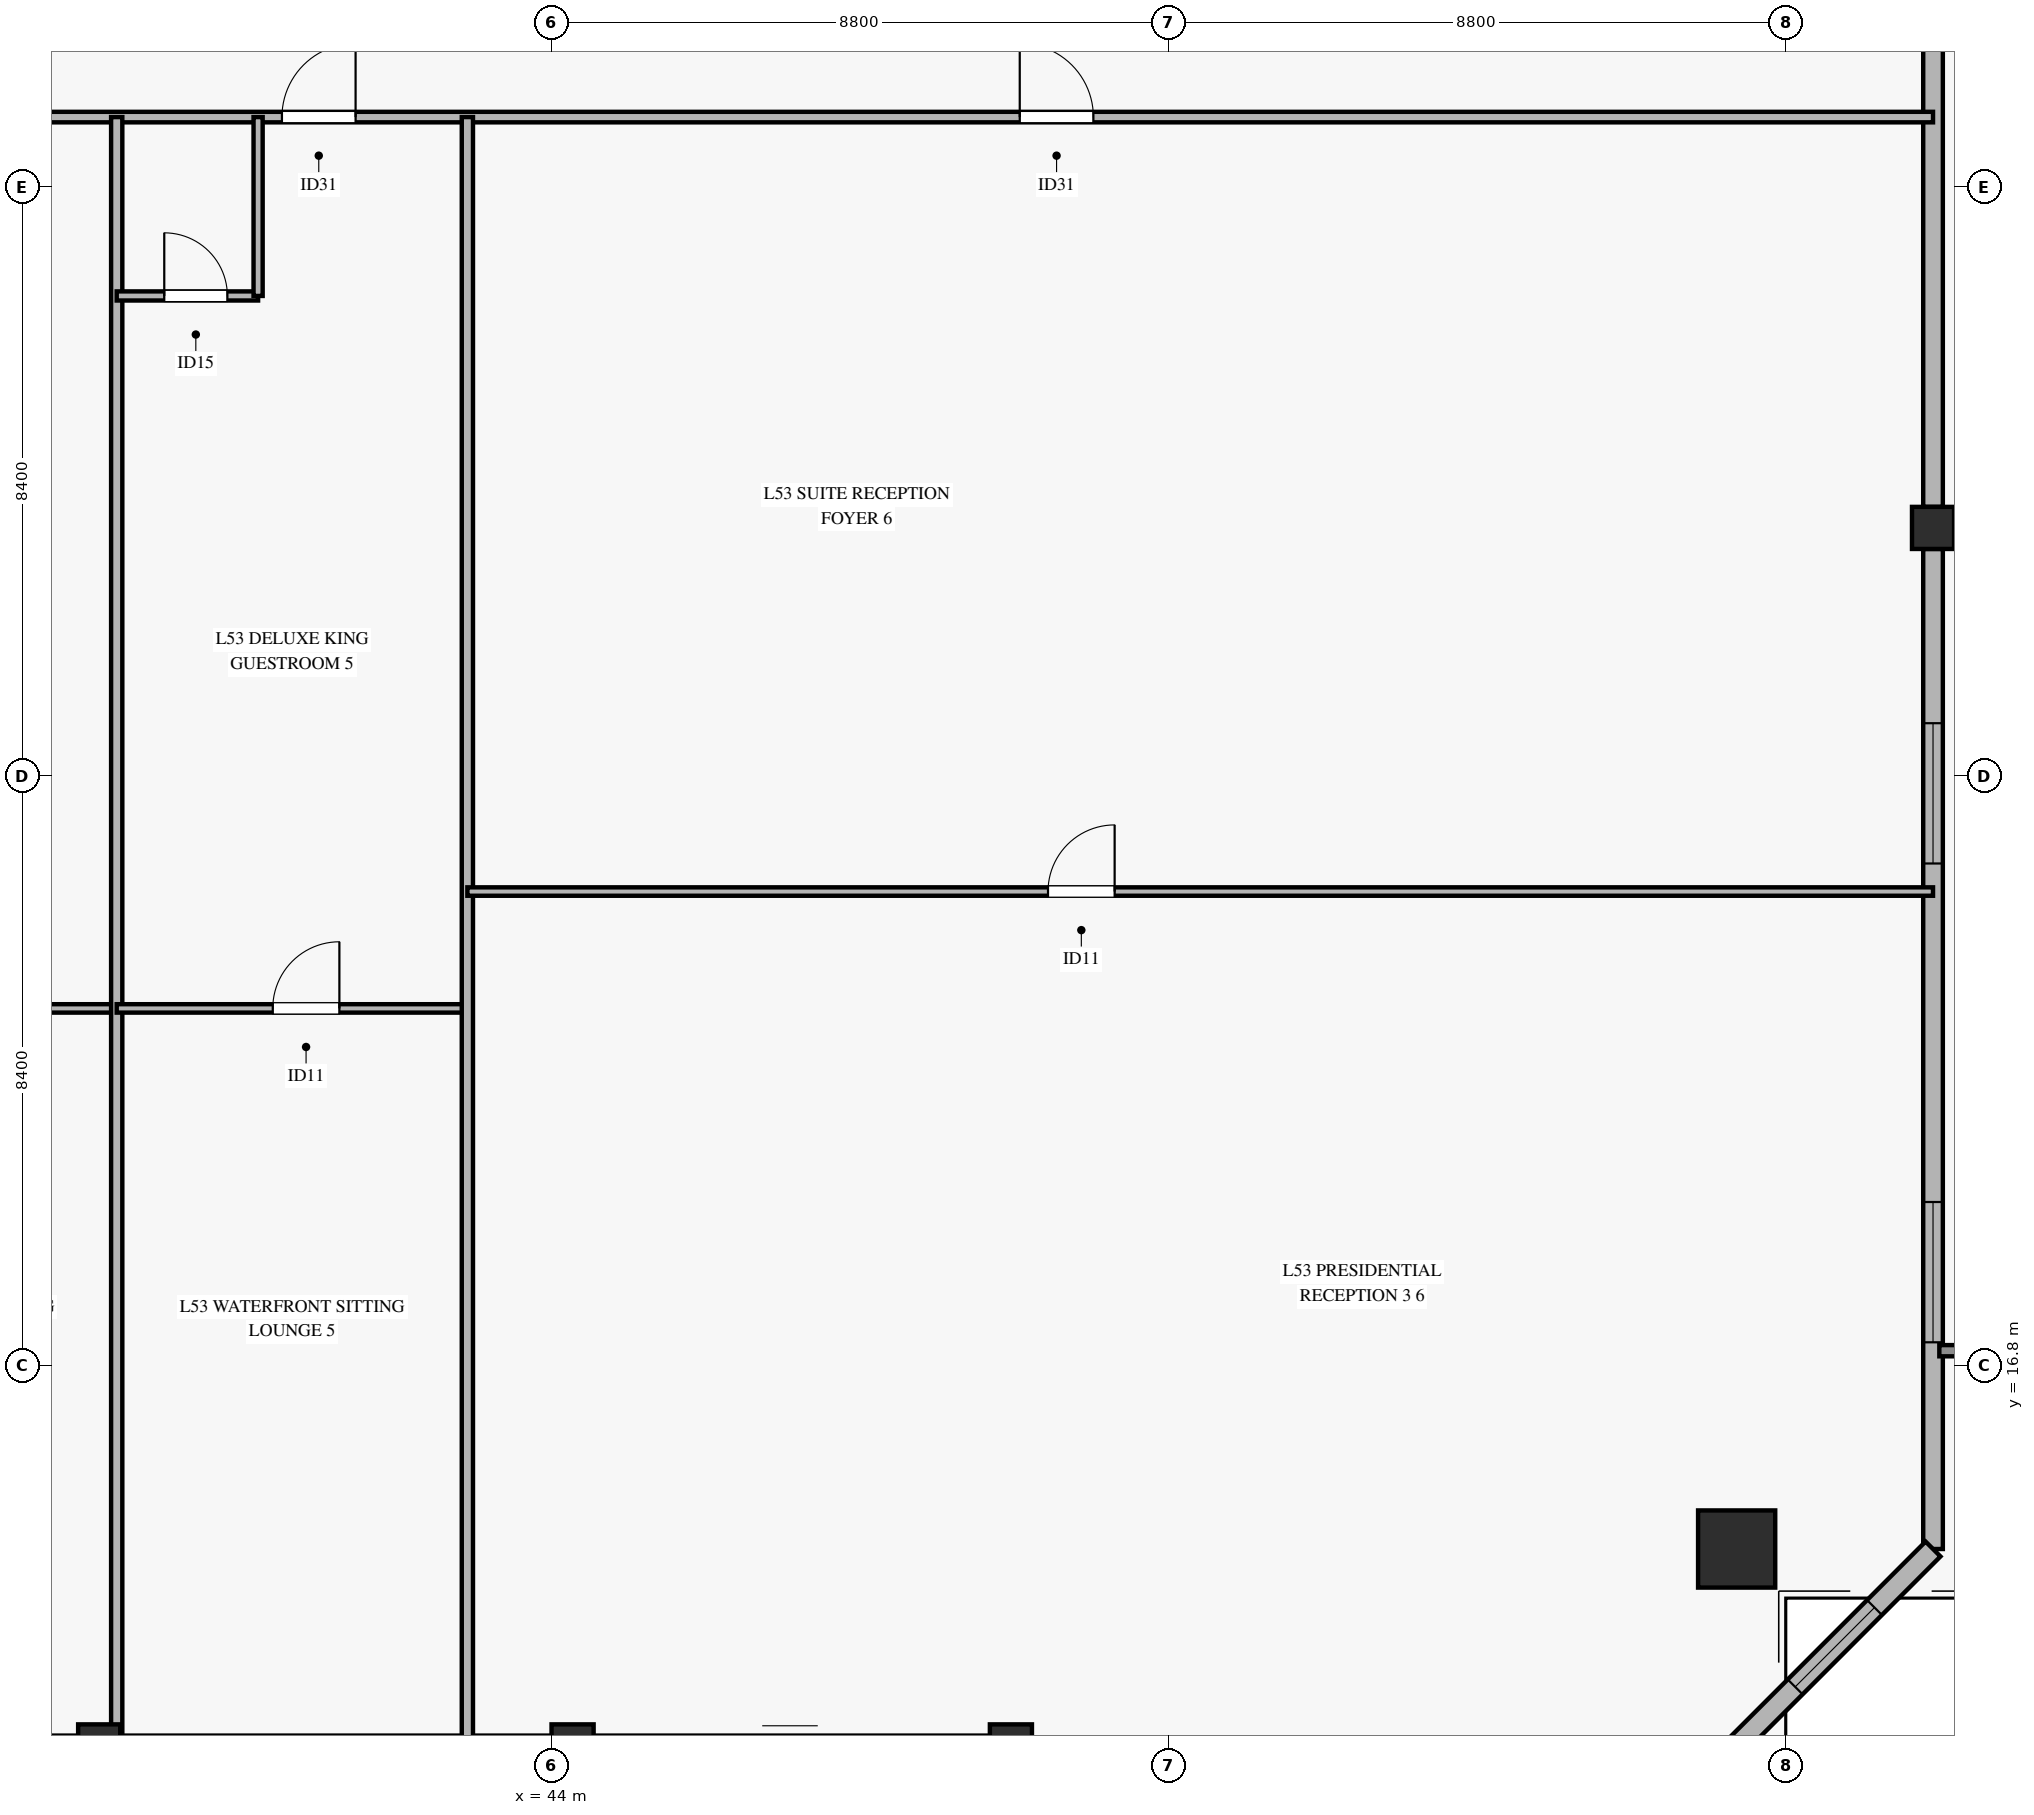
"""IFC4 building model, lengths in metres.
Left out: names, types, materials, properties, quantities, classifications, styles, units other than length and angle.
Written with IfcOpenShell. Run it as: python <this file> out.ifc"""

import sys

from ifc_helpers import new_model, si_unit, direction, frame, frame_2d, origin, origin_2d, place, context, subcontext, project, spatial, rectangle, hollow_rectangle, extrude, source, transform, mapped, element, fill, save


model = new_model("IFC4")
c1 = context("Model", 3, precision=1e-05, world=origin(), true_north=direction((0.0, 1.0)))
c2 = subcontext(c1, "Body", "Model", "MODEL_VIEW")
j1 = project(units=[si_unit("LENGTHUNIT", "METRE"), si_unit("PLANEANGLEUNIT", "RADIAN")], contexts=[c1])
p1 = place(None, origin())
s1 = spatial("IfcSite", under=j1, at=p1, CompositionType="ELEMENT")
p2 = place(p1, origin())
s2 = spatial("IfcBuilding", under=s1, at=p2, CompositionType="ELEMENT")
p3 = place(p2, frame((0.0, 0.0, 209.7)))
s3 = spatial("IfcBuildingStorey", under=s2, at=p3, CompositionType="ELEMENT", Elevation=209.7)
m1 = source(origin(), c2, "Body", "SweptSolid", [
    extrude(hollow_rectangle(XDim=1.1, YDim=1.1, WallThickness=0.05, at=origin_2d()), origin(), (0.0, 0.0, 1.0), 3.408),
])
p4 = place(p3, frame((60.898, 14.186, 0.0), z_axis=(-0.108529227713, 0.259968691334, 0.959498664021), x_axis=(-0.922813390135, -0.385247254355, 0.0)))
e1 = element("IfcColumn", 1, at=p4, inside=s3, PredefinedType="COLUMN", context=c2, shape_type="MappedRepresentation", body=[
    mapped(m1, transform((0.0, 0.0, 0.0), x_axis=(1.0, 0.0, 0.0), y_axis=(0.0, 1.0, 0.0), z_axis=(0.0, 0.0, 1.0), scale=1.0)),
])
m2 = source(origin(), c2, "Body", "SweptSolid", [
    extrude(hollow_rectangle(XDim=0.6, YDim=0.6, WallThickness=0.028, at=origin_2d()), origin(), (0.0, 0.0, 1.0), 3.4),
])
for number, where, z_axis, x_axis in (
    (2, (37.55, 11.386, 0.0), (0.0, 0.274, 0.962), (-1.0, 0.0, 0.0)),
    (3, (44.3, 11.386, 0.0), (0.0, 0.274, 0.962), (-1.0, 0.0, 0.0)),
    (4, (50.55, 11.386, 0.0), (0.0, 0.274, 0.962), (-1.0, 0.0, 0.0)),
):
    element("IfcColumn", number, at=place(p3, frame(where, z_axis=z_axis, x_axis=x_axis)), inside=s3, PredefinedType="COLUMN", context=c2, shape_type="MappedRepresentation", body=[
        mapped(m2, transform((0.0, 0.0, 0.0), x_axis=(1.0, 0.0, 0.0), y_axis=(0.0, 1.0, 0.0), z_axis=(0.0, 0.0, 1.0), scale=1.0)),
    ])
m3 = source(origin(), c2, "Body", "SweptSolid", [
    extrude(hollow_rectangle(XDim=0.6, YDim=0.6, WallThickness=0.028, at=origin_2d()), origin(), (0.0, 0.0, 1.0), 3.329),
])
p5 = place(p3, frame((63.698, 28.743, 0.0), z_axis=(-0.124961102181, 0.139994568113, 0.982235330173), x_axis=(-0.746027795602, -0.665914805504, 0.0)))
e5 = element("IfcColumn", 5, at=p5, inside=s3, PredefinedType="COLUMN", context=c2, shape_type="MappedRepresentation", body=[
    mapped(m3, transform((0.0, 0.0, 0.0), x_axis=(1.0, 0.0, 0.0), y_axis=(0.0, 1.0, 0.0), z_axis=(0.0, 0.0, 1.0), scale=1.0)),
])
for number, where, z_axis, x_axis in (
    (6, (31.1, 11.386, 0.0), (0.0, 0.0, 1.0), (1.0, 0.0, 0.0)),
    (7, (37.85, 11.386, 0.0), (0.0, 0.0, 1.0), (1.0, 0.0, 0.0)),
):
    element("IfcWall", number, at=place(p3, frame(where, z_axis=z_axis, x_axis=x_axis)), inside=s3, PredefinedType="SOLIDWALL", context=c2, shape_type="SweptSolid", body=[
        extrude(rectangle(XDim=6.15, YDim=0.28, at=frame_2d((3.075, 0.0))), origin(), (0.0, 0.0, 1.0), 2.75),
    ])
p6 = place(p3, frame((44.6, 11.386, 0.0), z_axis=(0.0, 0.0, 1.0), x_axis=(1.0, 0.0, 0.0)))
e8 = element("IfcWall", 8, at=p6, inside=s3, PredefinedType="SOLIDWALL", context=c2, shape_type="SweptSolid", body=[
    extrude(rectangle(XDim=5.65, YDim=0.28, at=frame_2d((2.825, 0.0))), origin(), (0.0, 0.0, 1.0), 2.75),
])
p7 = place(p6, frame((1.9, 0.0, 0.0)))
e9 = element("IfcOpeningElement", 9, at=p7, cuts=e8, PredefinedType="OPENING", context=c2, shape_type="SweptSolid", body=[
    extrude(rectangle(XDim=1.8, YDim=2.25, at=frame_2d((0.9, 1.125))), frame((0.0, 0.15, 0.0), z_axis=(0.0, -1.0, 0.0), x_axis=(1.0, 0.0, 0.0)), (0.0, 0.0, 1.0), 0.3),
])
p8 = place(p3, frame((63.698, 14.186, 0.0), z_axis=(0.0, 0.0, 1.0), x_axis=(0.0, 1.0, 0.0)))
e10 = element("IfcWall", 10, at=p8, inside=s3, PredefinedType="SOLIDWALL", context=c2, shape_type="SweptSolid", body=[
    extrude(rectangle(XDim=14.257, YDim=0.28, at=frame_2d((7.128, 0.0))), origin(), (0.0, 0.0, 1.0), 2.75),
])
p9 = place(p8, frame((2.947, 0.0, 0.45)))
e11 = element("IfcOpeningElement", 11, at=p9, cuts=e10, PredefinedType="OPENING", context=c2, shape_type="SweptSolid", body=[
    extrude(rectangle(XDim=2.0, YDim=2.0, at=frame_2d((1.0, 1.0))), frame((0.0, 0.15, 0.0), z_axis=(0.0, -1.0, 0.0), x_axis=(1.0, 0.0, 0.0)), (0.0, 0.0, 1.0), 0.3),
])
p10 = place(p8, frame((9.773, 0.0, 0.45)))
e12 = element("IfcOpeningElement", 12, at=p10, cuts=e10, PredefinedType="OPENING", context=c2, shape_type="SweptSolid", body=[
    extrude(rectangle(XDim=2.0, YDim=2.0, at=frame_2d((1.0, 1.0))), frame((0.0, 0.15, 0.0), z_axis=(0.0, -1.0, 0.0), x_axis=(1.0, 0.0, 0.0)), (0.0, 0.0, 1.0), 0.3),
])
p11 = place(p3, frame((63.698, 29.043, 0.0), z_axis=(0.0, 0.0, 1.0), x_axis=(0.0, 1.0, 0.0)))
e13 = element("IfcWall", 13, at=p11, inside=s3, PredefinedType="SOLIDWALL", context=c2, shape_type="SweptSolid", body=[
    extrude(rectangle(XDim=14.257, YDim=0.28, at=frame_2d((7.128, 0.0))), origin(), (0.0, 0.0, 1.0), 2.75),
])
p12 = place(p11, frame((8.812, 0.0, 0.45)))
e14 = element("IfcOpeningElement", 14, at=p12, cuts=e13, PredefinedType="OPENING", context=c2, shape_type="SweptSolid", body=[
    extrude(rectangle(XDim=2.0, YDim=2.0, at=frame_2d((1.0, 1.0))), frame((0.0, 0.15, 0.0), z_axis=(0.0, -1.0, 0.0), x_axis=(1.0, 0.0, 0.0)), (0.0, 0.0, 1.0), 0.3),
])
p13 = place(p3, frame((60.898, 11.386, 0.0), z_axis=(0.0, 0.0, 1.0), x_axis=(0.707106781187, 0.707106781187, 0.0)))
e15 = element("IfcWall", 15, at=p13, inside=s3, PredefinedType="SOLIDWALL", context=c2, shape_type="SweptSolid", body=[
    extrude(rectangle(XDim=3.96, YDim=0.3, at=frame_2d((1.98, 0.0))), origin(), (0.0, 0.0, 1.0), 2.75),
])
p14 = place(p13, frame((1.18, 0.0, 0.45)))
e16 = element("IfcOpeningElement", 16, at=p14, cuts=e15, PredefinedType="OPENING", context=c2, shape_type="SweptSolid", body=[
    extrude(rectangle(XDim=1.6, YDim=2.0, at=frame_2d((0.8, 1.0))), frame((0.0, 0.16, 0.0), z_axis=(0.0, -1.0, 0.0), x_axis=(1.0, 0.0, 0.0)), (0.0, 0.0, 1.0), 0.32),
])
p15 = place(p3, frame((6.703, 34.6, 0.0), z_axis=(0.0, 0.0, 1.0), x_axis=(1.0, 0.0, 0.0)))
e17 = element("IfcWall", 17, at=p15, inside=s3, PredefinedType="PARTITIONING", context=c2, shape_type="SweptSolid", body=[
    extrude(rectangle(XDim=56.995, YDim=0.15, at=frame_2d((28.498, 0.0))), origin(), (0.0, 0.0, 1.0), 2.455),
])
p16 = place(p15, frame((6.439, 0.0, 0.0)))
e18 = element("IfcOpeningElement", 18, at=p16, cuts=e17, PredefinedType="OPENING", context=c2, shape_type="SweptSolid", body=[
    extrude(rectangle(XDim=1.05, YDim=2.15, at=frame_2d((0.525, 1.075))), frame((0.0, 0.085, 0.0), z_axis=(0.0, -1.0, 0.0), x_axis=(1.0, 0.0, 0.0)), (0.0, 0.0, 1.0), 0.17),
])
p17 = place(p15, frame((17.794, 0.0, 0.0)))
e19 = element("IfcOpeningElement", 19, at=p17, cuts=e17, PredefinedType="OPENING", context=c2, shape_type="SweptSolid", body=[
    extrude(rectangle(XDim=1.05, YDim=2.15, at=frame_2d((0.525, 1.075))), frame((0.0, 0.085, 0.0), z_axis=(0.0, -1.0, 0.0), x_axis=(1.0, 0.0, 0.0)), (0.0, 0.0, 1.0), 0.17),
])
p18 = place(p15, frame((23.166, 0.0, 0.0)))
e20 = element("IfcOpeningElement", 20, at=p18, cuts=e17, PredefinedType="OPENING", context=c2, shape_type="SweptSolid", body=[
    extrude(rectangle(XDim=1.05, YDim=2.15, at=frame_2d((0.525, 1.075))), frame((0.0, 0.085, 0.0), z_axis=(0.0, -1.0, 0.0), x_axis=(1.0, 0.0, 0.0)), (0.0, 0.0, 1.0), 0.17),
])
p19 = place(p15, frame((28.453, 0.0, 0.0)))
e21 = element("IfcOpeningElement", 21, at=p19, cuts=e17, PredefinedType="OPENING", context=c2, shape_type="SweptSolid", body=[
    extrude(rectangle(XDim=1.05, YDim=2.15, at=frame_2d((0.525, 1.075))), frame((0.0, 0.085, 0.0), z_axis=(0.0, -1.0, 0.0), x_axis=(1.0, 0.0, 0.0)), (0.0, 0.0, 1.0), 0.17),
])
p20 = place(p15, frame((33.453, 0.0, 0.0)))
e22 = element("IfcOpeningElement", 22, at=p20, cuts=e17, PredefinedType="OPENING", context=c2, shape_type="SweptSolid", body=[
    extrude(rectangle(XDim=1.05, YDim=2.15, at=frame_2d((0.525, 1.075))), frame((0.0, 0.085, 0.0), z_axis=(0.0, -1.0, 0.0), x_axis=(1.0, 0.0, 0.0)), (0.0, 0.0, 1.0), 0.17),
])
p21 = place(p15, frame((43.973, 0.0, 0.0)))
e23 = element("IfcOpeningElement", 23, at=p21, cuts=e17, PredefinedType="OPENING", context=c2, shape_type="SweptSolid", body=[
    extrude(rectangle(XDim=1.05, YDim=2.15, at=frame_2d((0.525, 1.075))), frame((0.0, 0.085, 0.0), z_axis=(0.0, -1.0, 0.0), x_axis=(1.0, 0.0, 0.0)), (0.0, 0.0, 1.0), 0.17),
])
p22 = place(p3, frame((32.8, 21.893, 0.0), z_axis=(0.0, 0.0, 1.0), x_axis=(1.0, 0.0, 0.0)))
e24 = element("IfcWall", 24, at=p22, inside=s3, PredefinedType="PARTITIONING", context=c2, shape_type="SweptSolid", body=[
    extrude(rectangle(XDim=5.0, YDim=0.12, at=frame_2d((2.5, 0.0))), origin(), (0.0, 0.0, 1.0), 2.455),
])
p23 = place(p22, frame((2.225, 0.0, 0.0)))
e25 = element("IfcOpeningElement", 25, at=p23, cuts=e24, PredefinedType="OPENING", context=c2, shape_type="SweptSolid", body=[
    extrude(rectangle(XDim=0.95, YDim=2.1, at=frame_2d((0.475, 1.05))), frame((0.0, 0.07, 0.0), z_axis=(0.0, -1.0, 0.0), x_axis=(1.0, 0.0, 0.0)), (0.0, 0.0, 1.0), 0.14),
])
p24 = place(p3, frame((37.8, 11.386, 0.0), z_axis=(0.0, 0.0, 1.0), x_axis=(0.0, 1.0, 0.0)))
e26 = element("IfcWall", 26, at=p24, inside=s3, PredefinedType="PARTITIONING", context=c2, shape_type="SweptSolid", body=[
    extrude(rectangle(XDim=23.214, YDim=0.16, at=frame_2d((11.607, 0.0))), origin(), (0.0, 0.0, 1.0), 2.455),
])
p25 = place(p3, frame((37.8, 32.05, 0.0), z_axis=(0.0, 0.0, 1.0), x_axis=(1.0, 0.0, 0.0)))
e27 = element("IfcWall", 27, at=p25, inside=s3, PredefinedType="PARTITIONING", context=c2, shape_type="SweptSolid", body=[
    extrude(rectangle(XDim=2.016, YDim=0.13, at=frame_2d((1.008, 0.0))), origin(), (0.0, 0.0, 1.0), 3.27),
])
p26 = place(p25, frame((0.678, 0.0, 0.0)))
e28 = element("IfcOpeningElement", 28, at=p26, cuts=e27, PredefinedType="OPENING", context=c2, shape_type="SweptSolid", body=[
    extrude(rectangle(XDim=0.9, YDim=2.1, at=frame_2d((0.45, 1.05))), frame((0.0, 0.075, 0.0), z_axis=(0.0, -1.0, 0.0), x_axis=(1.0, 0.0, 0.0)), (0.0, 0.0, 1.0), 0.15),
])
p27 = place(p3, frame((39.816, 32.05, 0.0), z_axis=(0.0, 0.0, 1.0), x_axis=(0.0, 1.0, 0.0)))
e29 = element("IfcWall", 29, at=p27, inside=s3, PredefinedType="PARTITIONING", context=c2, shape_type="SweptSolid", body=[
    extrude(rectangle(XDim=2.55, YDim=0.13, at=frame_2d((1.275, 0.0))), origin(), (0.0, 0.0, 1.0), 2.855),
])
p28 = place(p3, frame((37.8, 21.893, 0.0), z_axis=(0.0, 0.0, 1.0), x_axis=(1.0, 0.0, 0.0)))
e30 = element("IfcWall", 30, at=p28, inside=s3, PredefinedType="PARTITIONING", context=c2, shape_type="SweptSolid", body=[
    extrude(rectangle(XDim=5.0, YDim=0.12, at=frame_2d((2.5, 0.0))), origin(), (0.0, 0.0, 1.0), 3.27),
])
p29 = place(p28, frame((2.225, 0.0, 0.0)))
e31 = element("IfcOpeningElement", 31, at=p29, cuts=e30, PredefinedType="OPENING", context=c2, shape_type="SweptSolid", body=[
    extrude(rectangle(XDim=0.95, YDim=2.1, at=frame_2d((0.475, 1.05))), frame((0.0, 0.07, 0.0), z_axis=(0.0, -1.0, 0.0), x_axis=(1.0, 0.0, 0.0)), (0.0, 0.0, 1.0), 0.14),
])
p30 = place(p3, frame((42.8, 11.386, 0.0), z_axis=(0.0, 0.0, 1.0), x_axis=(0.0, 1.0, 0.0)))
e32 = element("IfcWall", 32, at=p30, inside=s3, PredefinedType="PARTITIONING", context=c2, shape_type="SweptSolid", body=[
    extrude(rectangle(XDim=23.214, YDim=0.16, at=frame_2d((11.607, 0.0))), origin(), (0.0, 0.0, 1.0), 2.755),
])
p31 = place(p3, frame((42.8, 23.559, 0.0), z_axis=(0.0, 0.0, 1.0), x_axis=(1.0, 0.0, 0.0)))
e33 = element("IfcWall", 33, at=p31, inside=s3, PredefinedType="PARTITIONING", context=c2, shape_type="SweptSolid", body=[
    extrude(rectangle(XDim=20.898, YDim=0.12, at=frame_2d((10.449, 0.0))), origin(), (0.0, 0.0, 1.0), 2.455),
])
p32 = place(p31, frame((8.279, 0.0, 0.0)))
e34 = element("IfcOpeningElement", 34, at=p32, cuts=e33, PredefinedType="OPENING", context=c2, shape_type="SweptSolid", body=[
    extrude(rectangle(XDim=0.95, YDim=2.1, at=frame_2d((0.475, 1.05))), frame((0.0, 0.07, 0.0), z_axis=(0.0, -1.0, 0.0), x_axis=(1.0, 0.0, 0.0)), (0.0, 0.0, 1.0), 0.14),
])
m4 = source(origin(), c2, "Body", "SweptSolid", [
    extrude(rectangle(XDim=2.0, YDim=2.0, at=frame_2d((1.0, 1.0))), frame((0.0, 0.03, 0.0), z_axis=(0.0, -1.0, 0.0), x_axis=(1.0, 0.0, 0.0)), (0.0, 0.0, 1.0), 0.06),
])
p33 = place(p9, origin())
e35 = element("IfcWindow", 35, at=p33, inside=s3, PartitioningType="SINGLE_PANEL", PredefinedType="WINDOW", context=c2, shape_type="MappedRepresentation", body=[
    mapped(m4, transform((0.0, 0.0, 0.0), x_axis=(1.0, 0.0, 0.0), y_axis=(0.0, 1.0, 0.0), z_axis=(0.0, 0.0, 1.0), scale=1.0)),
])
fill(e11, e35)
p34 = place(p10, origin())
e36 = element("IfcWindow", 36, at=p34, inside=s3, PartitioningType="SINGLE_PANEL", PredefinedType="WINDOW", context=c2, shape_type="MappedRepresentation", body=[
    mapped(m4, transform((0.0, 0.0, 0.0), x_axis=(1.0, 0.0, 0.0), y_axis=(0.0, 1.0, 0.0), z_axis=(0.0, 0.0, 1.0), scale=1.0)),
])
fill(e12, e36)
m5 = source(origin(), c2, "Body", "SweptSolid", [
    extrude(rectangle(XDim=1.6, YDim=2.0, at=frame_2d((0.8, 1.0))), frame((0.0, 0.03, 0.0), z_axis=(0.0, -1.0, 0.0), x_axis=(1.0, 0.0, 0.0)), (0.0, 0.0, 1.0), 0.06),
])
p35 = place(p14, origin())
e37 = element("IfcWindow", 37, at=p35, inside=s3, PartitioningType="SINGLE_PANEL", PredefinedType="WINDOW", context=c2, shape_type="MappedRepresentation", body=[
    mapped(m5, transform((0.0, 0.0, 0.0), x_axis=(1.0, 0.0, 0.0), y_axis=(0.0, 1.0, 0.0), z_axis=(0.0, 0.0, 1.0), scale=1.0)),
])
fill(e16, e37)
m6 = source(origin(), c2, "Body", "SweptSolid", [
    extrude(rectangle(XDim=1.05, YDim=2.15, at=frame_2d((0.525, 1.075))), frame((0.0, 0.025, 0.0), z_axis=(0.0, -1.0, 0.0), x_axis=(1.0, 0.0, 0.0)), (0.0, 0.0, 1.0), 0.05),
])
p36 = place(p20, origin())
e38 = element("IfcDoor", 38, at=p36, inside=s3, OperationType="SINGLE_SWING_RIGHT", PredefinedType="DOOR", context=c2, shape_type="MappedRepresentation", body=[
    mapped(m6, transform((0.0, 0.0, 0.0), x_axis=(1.0, 0.0, 0.0), y_axis=(0.0, 1.0, 0.0), z_axis=(0.0, 0.0, 1.0), scale=1.0)),
])
fill(e22, e38)
m7 = source(origin(), c2, "Body", "SweptSolid", [
    extrude(rectangle(XDim=0.9, YDim=2.1, at=frame_2d((0.45, 1.05))), frame((0.0, 0.025, 0.0), z_axis=(0.0, -1.0, 0.0), x_axis=(1.0, 0.0, 0.0)), (0.0, 0.0, 1.0), 0.05),
])
p37 = place(p26, origin())
e39 = element("IfcDoor", 39, at=p37, inside=s3, OperationType="SINGLE_SWING_LEFT", PredefinedType="DOOR", context=c2, shape_type="MappedRepresentation", body=[
    mapped(m7, transform((0.0, 0.0, 0.0), x_axis=(1.0, 0.0, 0.0), y_axis=(0.0, 1.0, 0.0), z_axis=(0.0, 0.0, 1.0), scale=1.0)),
])
fill(e28, e39)
m8 = source(origin(), c2, "Body", "SweptSolid", [
    extrude(rectangle(XDim=0.95, YDim=2.1, at=frame_2d((0.475, 1.05))), frame((0.0, 0.025, 0.0), z_axis=(0.0, -1.0, 0.0), x_axis=(1.0, 0.0, 0.0)), (0.0, 0.0, 1.0), 0.05),
])
p38 = place(p29, origin())
e40 = element("IfcDoor", 40, at=p38, inside=s3, OperationType="SINGLE_SWING_RIGHT", PredefinedType="DOOR", context=c2, shape_type="MappedRepresentation", body=[
    mapped(m8, transform((0.0, 0.0, 0.0), x_axis=(1.0, 0.0, 0.0), y_axis=(0.0, 1.0, 0.0), z_axis=(0.0, 0.0, 1.0), scale=1.0)),
])
fill(e31, e40)
p39 = place(p21, origin())
e41 = element("IfcDoor", 41, at=p39, inside=s3, OperationType="SINGLE_SWING_LEFT", PredefinedType="DOOR", context=c2, shape_type="MappedRepresentation", body=[
    mapped(m6, transform((0.0, 0.0, 0.0), x_axis=(1.0, 0.0, 0.0), y_axis=(0.0, 1.0, 0.0), z_axis=(0.0, 0.0, 1.0), scale=1.0)),
])
fill(e23, e41)
p40 = place(p32, origin())
e42 = element("IfcDoor", 42, at=p40, inside=s3, OperationType="SINGLE_SWING_RIGHT", PredefinedType="DOOR", context=c2, shape_type="MappedRepresentation", body=[
    mapped(m8, transform((0.0, 0.0, 0.0), x_axis=(1.0, 0.0, 0.0), y_axis=(0.0, 1.0, 0.0), z_axis=(0.0, 0.0, 1.0), scale=1.0)),
])
fill(e34, e42)
save(model, sys.argv[1])
